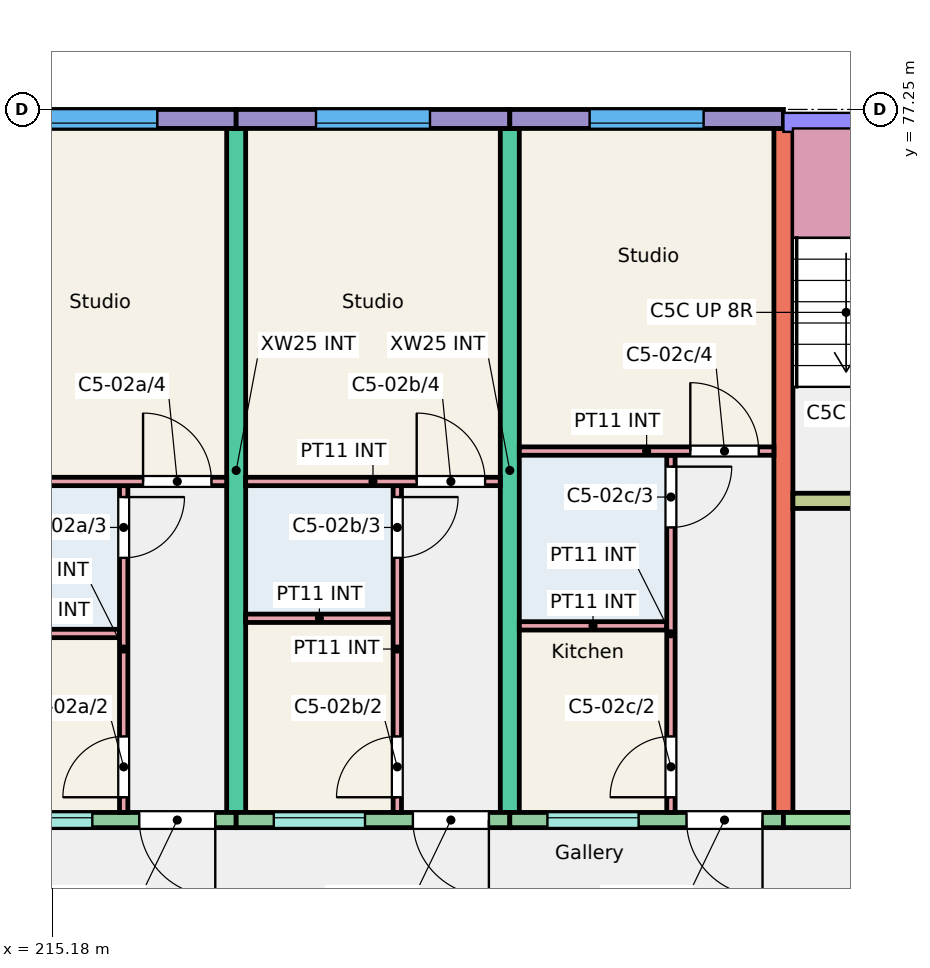
"""IFC4 building model, lengths in metres.
Left out: names, types, materials, properties, quantities, classifications, styles, units other than length and angle.
Written with IfcOpenShell. Run it as: python <this file> out.ifc"""

import sys

from ifc_helpers import new_model, si_unit, direction, frame, frame_2d, origin, place, context, subcontext, project, spatial, rectangle, extrude, element, fill, save


model = new_model("IFC4")
c1 = context("Model", 3, precision=1e-05, world=origin(), true_north=direction((0.0, 1.0)))
c2 = subcontext(c1, "Body", "Model", "MODEL_VIEW")
j1 = project(units=[si_unit("LENGTHUNIT", "METRE"), si_unit("PLANEANGLEUNIT", "RADIAN")], contexts=[c1])
p1 = place(None, origin())
s1 = spatial("IfcSite", under=j1, at=p1, CompositionType="ELEMENT")
p2 = place(p1, origin())
s2 = spatial("IfcBuilding", under=s1, at=p2, CompositionType="ELEMENT")
p3 = place(p2, frame((0.0, 0.0, 6.0)))
s3 = spatial("IfcBuildingStorey", under=s2, at=p3, CompositionType="ELEMENT", Elevation=6.0)
for number, where, z_axis, x_axis in (
    (1, (217.6, 68.0, 0.0), (0.0, 0.0, 1.0), (0.0, 1.0, 0.0)),
    (2, (221.2, 68.0, 0.0), (0.0, 0.0, 1.0), (0.0, 1.0, 0.0)),
    (3, (224.8, 68.0, 0.0), (0.0, 0.0, 1.0), (0.0, 1.0, 0.0)),
):
    element("IfcWall", number, at=place(p3, frame(where, z_axis=z_axis, x_axis=x_axis)), inside=s3, PredefinedType="SHEAR", context=c2, shape_type="SweptSolid", body=[
        extrude(rectangle(XDim=9.0, YDim=0.25, at=frame_2d((4.5, 0.0))), origin(), (0.0, 0.0, 1.0), 3.0),
    ])
p4 = place(p3, frame((214.0, 77.125, 0.0), z_axis=(0.0, 0.0, 1.0), x_axis=(1.0, 0.0, 0.0)))
e4 = element("IfcWall", 4, at=p4, inside=s3, PredefinedType="SOLIDWALL", context=c2, shape_type="SweptSolid", body=[
    extrude(rectangle(XDim=3.6, YDim=0.25, at=frame_2d((1.8, 0.0))), origin(), (0.0, 0.0, 1.0), 3.0),
])
p5 = place(p4, frame((1.062, 0.0, 0.9)))
e5 = element("IfcOpeningElement", 5, at=p5, cuts=e4, PredefinedType="OPENING", context=c2, shape_type="SweptSolid", body=[
    extrude(rectangle(XDim=1.5, YDim=1.5, at=frame_2d((0.75, 0.75))), frame((0.0, 0.135, 0.0), z_axis=(0.0, -1.0, 0.0), x_axis=(1.0, 0.0, 0.0)), (0.0, 0.0, 1.0), 0.27),
])
p6 = place(p3, frame((214.15, 67.9, 0.0), z_axis=(0.0, 0.0, 1.0), x_axis=(1.0, 0.0, 0.0)))
e6 = element("IfcWall", 6, at=p6, inside=s3, PredefinedType="SOLIDWALL", context=c2, shape_type="SweptSolid", body=[
    extrude(rectangle(XDim=3.45, YDim=0.2, at=frame_2d((1.725, 0.0))), origin(), (0.0, 0.0, 1.0), 3.0),
])
p7 = place(p6, frame((0.357, 0.0, 1.1)))
e7 = element("IfcOpeningElement", 7, at=p7, cuts=e6, PredefinedType="OPENING", context=c2, shape_type="SweptSolid", body=[
    extrude(rectangle(XDim=1.2, YDim=1.3, at=frame_2d((0.6, 0.65))), frame((0.0, 0.11, 0.0), z_axis=(0.0, -1.0, 0.0), x_axis=(1.0, 0.0, 0.0)), (0.0, 0.0, 1.0), 0.22),
])
p8 = place(p6, frame((2.175, 0.0, 0.0)))
e8 = element("IfcOpeningElement", 8, at=p8, cuts=e6, PredefinedType="OPENING", context=c2, shape_type="SweptSolid", body=[
    extrude(rectangle(XDim=1.0, YDim=2.1, at=frame_2d((0.5, 1.05))), frame((0.0, 0.11, 0.0), z_axis=(0.0, -1.0, 0.0), x_axis=(1.0, 0.0, 0.0)), (0.0, 0.0, 1.0), 0.22),
])
p9 = place(p3, frame((217.6, 77.125, 0.0), z_axis=(0.0, 0.0, 1.0), x_axis=(1.0, 0.0, 0.0)))
e9 = element("IfcWall", 9, at=p9, inside=s3, PredefinedType="SOLIDWALL", context=c2, shape_type="SweptSolid", body=[
    extrude(rectangle(XDim=3.6, YDim=0.25, at=frame_2d((1.8, 0.0))), origin(), (0.0, 0.0, 1.0), 3.0),
])
p10 = place(p9, frame((1.05, 0.0, 0.9)))
e10 = element("IfcOpeningElement", 10, at=p10, cuts=e9, PredefinedType="OPENING", context=c2, shape_type="SweptSolid", body=[
    extrude(rectangle(XDim=1.5, YDim=1.5, at=frame_2d((0.75, 0.75))), frame((0.0, 0.135, 0.0), z_axis=(0.0, -1.0, 0.0), x_axis=(1.0, 0.0, 0.0)), (0.0, 0.0, 1.0), 0.27),
])
p11 = place(p3, frame((217.6, 67.9, 0.0), z_axis=(0.0, 0.0, 1.0), x_axis=(1.0, 0.0, 0.0)))
e11 = element("IfcWall", 11, at=p11, inside=s3, PredefinedType="SOLIDWALL", context=c2, shape_type="SweptSolid", body=[
    extrude(rectangle(XDim=3.6, YDim=0.2, at=frame_2d((1.8, 0.0))), origin(), (0.0, 0.0, 1.0), 3.0),
])
p12 = place(p11, frame((0.495, 0.0, 1.1)))
e12 = element("IfcOpeningElement", 12, at=p12, cuts=e11, PredefinedType="OPENING", context=c2, shape_type="SweptSolid", body=[
    extrude(rectangle(XDim=1.2, YDim=1.3, at=frame_2d((0.6, 0.65))), frame((0.0, 0.11, 0.0), z_axis=(0.0, -1.0, 0.0), x_axis=(1.0, 0.0, 0.0)), (0.0, 0.0, 1.0), 0.22),
])
p13 = place(p11, frame((2.325, 0.0, 0.0)))
e13 = element("IfcOpeningElement", 13, at=p13, cuts=e11, PredefinedType="OPENING", context=c2, shape_type="SweptSolid", body=[
    extrude(rectangle(XDim=1.0, YDim=2.1, at=frame_2d((0.5, 1.05))), frame((0.0, 0.11, 0.0), z_axis=(0.0, -1.0, 0.0), x_axis=(1.0, 0.0, 0.0)), (0.0, 0.0, 1.0), 0.22),
])
p14 = place(p3, frame((221.2, 77.125, 0.0), z_axis=(0.0, 0.0, 1.0), x_axis=(1.0, 0.0, 0.0)))
e14 = element("IfcWall", 14, at=p14, inside=s3, PredefinedType="SOLIDWALL", context=c2, shape_type="SweptSolid", body=[
    extrude(rectangle(XDim=3.6, YDim=0.25, at=frame_2d((1.8, 0.0))), origin(), (0.0, 0.0, 1.0), 3.0),
])
p15 = place(p14, frame((1.05, 0.0, 0.9)))
e15 = element("IfcOpeningElement", 15, at=p15, cuts=e14, PredefinedType="OPENING", context=c2, shape_type="SweptSolid", body=[
    extrude(rectangle(XDim=1.5, YDim=1.5, at=frame_2d((0.75, 0.75))), frame((0.0, 0.135, 0.0), z_axis=(0.0, -1.0, 0.0), x_axis=(1.0, 0.0, 0.0)), (0.0, 0.0, 1.0), 0.27),
])
p16 = place(p3, frame((221.2, 67.9, 0.0), z_axis=(0.0, 0.0, 1.0), x_axis=(1.0, 0.0, 0.0)))
e16 = element("IfcWall", 16, at=p16, inside=s3, PredefinedType="SOLIDWALL", context=c2, shape_type="SweptSolid", body=[
    extrude(rectangle(XDim=3.6, YDim=0.2, at=frame_2d((1.8, 0.0))), origin(), (0.0, 0.0, 1.0), 3.0),
])
p17 = place(p16, frame((0.495, 0.0, 1.1)))
e17 = element("IfcOpeningElement", 17, at=p17, cuts=e16, PredefinedType="OPENING", context=c2, shape_type="SweptSolid", body=[
    extrude(rectangle(XDim=1.2, YDim=1.3, at=frame_2d((0.6, 0.65))), frame((0.0, 0.11, 0.0), z_axis=(0.0, -1.0, 0.0), x_axis=(1.0, 0.0, 0.0)), (0.0, 0.0, 1.0), 0.22),
])
p18 = place(p16, frame((2.325, 0.0, 0.0)))
e18 = element("IfcOpeningElement", 18, at=p18, cuts=e16, PredefinedType="OPENING", context=c2, shape_type="SweptSolid", body=[
    extrude(rectangle(XDim=1.0, YDim=2.1, at=frame_2d((0.5, 1.05))), frame((0.0, 0.11, 0.0), z_axis=(0.0, -1.0, 0.0), x_axis=(1.0, 0.0, 0.0)), (0.0, 0.0, 1.0), 0.22),
])
p19 = place(p3, frame((224.8, 67.9, 0.0), z_axis=(0.0, 0.0, 1.0), x_axis=(1.0, 0.0, 0.0)))
e19 = element("IfcWall", 19, at=p19, inside=s3, PredefinedType="SHEAR", context=c2, shape_type="SweptSolid", body=[
    extrude(rectangle(XDim=5.85, YDim=0.2, at=frame_2d((2.925, 0.0))), origin(), (0.0, 0.0, 1.0), 3.0),
])
p20 = place(p19, frame((2.438, 0.0, 0.0)))
e20 = element("IfcOpeningElement", 20, at=p20, cuts=e19, PredefinedType="OPENING", context=c2, shape_type="SweptSolid", body=[
    extrude(rectangle(XDim=1.1, YDim=2.1, at=frame_2d((0.55, 1.05))), frame((0.0, 0.11, 0.0), z_axis=(0.0, -1.0, 0.0), x_axis=(1.0, 0.0, 0.0)), (0.0, 0.0, 1.0), 0.22),
])
p21 = place(p3, frame((224.925, 72.1, 0.0), z_axis=(0.0, 0.0, 1.0), x_axis=(1.0, 0.0, 0.0)))
e21 = element("IfcWall", 21, at=p21, inside=s3, PredefinedType="SHEAR", context=c2, shape_type="SweptSolid", body=[
    extrude(rectangle(XDim=5.725, YDim=0.2, at=frame_2d((2.862, 0.0))), origin(), (0.0, 0.0, 1.0), 3.0),
])
p22 = place(p21, frame((0.95, 0.0, 0.0)))
e22 = element("IfcOpeningElement", 22, at=p22, cuts=e21, PredefinedType="OPENING", context=c2, shape_type="SweptSolid", body=[
    extrude(rectangle(XDim=1.0, YDim=2.1, at=frame_2d((0.5, 1.05))), frame((0.0, 0.11, 0.0), z_axis=(0.0, -1.0, 0.0), x_axis=(1.0, 0.0, 0.0)), (0.0, 0.0, 1.0), 0.22),
])
p23 = place(p21, frame((3.863, 0.0, 0.0)))
e23 = element("IfcOpeningElement", 23, at=p23, cuts=e21, PredefinedType="OPENING", context=c2, shape_type="SweptSolid", body=[
    extrude(rectangle(XDim=1.1, YDim=2.1, at=frame_2d((0.55, 1.05))), frame((0.0, 0.11, 0.0), z_axis=(0.0, -1.0, 0.0), x_axis=(1.0, 0.0, 0.0)), (0.0, 0.0, 1.0), 0.22),
])
p24 = place(p3, frame((214.15, 70.355, 0.0), z_axis=(0.0, 0.0, 1.0), x_axis=(1.0, 0.0, 0.0)))
e24 = element("IfcWall", 24, at=p24, inside=s3, PredefinedType="PARTITIONING", context=c2, shape_type="SweptSolid", body=[
    extrude(rectangle(XDim=1.915, YDim=0.11, at=frame_2d((0.958, 0.0))), origin(), (0.0, 0.0, 1.0), 2.8),
])
p25 = place(p3, frame((216.12, 68.0, 0.0), z_axis=(0.0, 0.0, 1.0), x_axis=(0.0, 1.0, 0.0)))
e25 = element("IfcWall", 25, at=p25, inside=s3, PredefinedType="PARTITIONING", context=c2, shape_type="SweptSolid", body=[
    extrude(rectangle(XDim=4.3, YDim=0.11, at=frame_2d((2.15, 0.0))), origin(), (0.0, 0.0, 1.0), 2.8),
])
p26 = place(p25, frame((0.2, 0.0, 0.0)))
e26 = element("IfcOpeningElement", 26, at=p26, cuts=e25, PredefinedType="OPENING", context=c2, shape_type="SweptSolid", body=[
    extrude(rectangle(XDim=0.8, YDim=2.1, at=frame_2d((0.4, 1.05))), frame((0.0, 0.065, 0.0), z_axis=(0.0, -1.0, 0.0), x_axis=(1.0, 0.0, 0.0)), (0.0, 0.0, 1.0), 0.13),
])
p27 = place(p25, frame((3.35, 0.0, 0.0)))
e27 = element("IfcOpeningElement", 27, at=p27, cuts=e25, PredefinedType="OPENING", context=c2, shape_type="SweptSolid", body=[
    extrude(rectangle(XDim=0.8, YDim=2.1, at=frame_2d((0.4, 1.05))), frame((0.0, 0.065, 0.0), z_axis=(0.0, -1.0, 0.0), x_axis=(1.0, 0.0, 0.0)), (0.0, 0.0, 1.0), 0.13),
])
p28 = place(p3, frame((214.15, 72.355, 0.0), z_axis=(0.0, 0.0, 1.0), x_axis=(1.0, 0.0, 0.0)))
e28 = element("IfcWall", 28, at=p28, inside=s3, PredefinedType="PARTITIONING", context=c2, shape_type="SweptSolid", body=[
    extrude(rectangle(XDim=3.325, YDim=0.11, at=frame_2d((1.663, 0.0))), origin(), (0.0, 0.0, 1.0), 2.8),
])
p29 = place(p28, frame((2.225, 0.0, 0.0)))
e29 = element("IfcOpeningElement", 29, at=p29, cuts=e28, PredefinedType="OPENING", context=c2, shape_type="SweptSolid", body=[
    extrude(rectangle(XDim=0.9, YDim=2.1, at=frame_2d((0.45, 1.05))), frame((0.0, 0.065, 0.0), z_axis=(0.0, -1.0, 0.0), x_axis=(1.0, 0.0, 0.0)), (0.0, 0.0, 1.0), 0.13),
])
p30 = place(p3, frame((217.725, 70.555, 0.0), z_axis=(0.0, 0.0, 1.0), x_axis=(1.0, 0.0, 0.0)))
e30 = element("IfcWall", 30, at=p30, inside=s3, PredefinedType="PARTITIONING", context=c2, shape_type="SweptSolid", body=[
    extrude(rectangle(XDim=1.94, YDim=0.11, at=frame_2d((0.97, 0.0))), origin(), (0.0, 0.0, 1.0), 2.8),
])
p31 = place(p3, frame((219.72, 68.0, 0.0), z_axis=(0.0, 0.0, 1.0), x_axis=(0.0, 1.0, 0.0)))
e31 = element("IfcWall", 31, at=p31, inside=s3, PredefinedType="PARTITIONING", context=c2, shape_type="SweptSolid", body=[
    extrude(rectangle(XDim=4.3, YDim=0.11, at=frame_2d((2.15, 0.0))), origin(), (0.0, 0.0, 1.0), 2.8),
])
p32 = place(p31, frame((0.2, 0.0, 0.0)))
e32 = element("IfcOpeningElement", 32, at=p32, cuts=e31, PredefinedType="OPENING", context=c2, shape_type="SweptSolid", body=[
    extrude(rectangle(XDim=0.8, YDim=2.1, at=frame_2d((0.4, 1.05))), frame((0.0, 0.065, 0.0), z_axis=(0.0, -1.0, 0.0), x_axis=(1.0, 0.0, 0.0)), (0.0, 0.0, 1.0), 0.13),
])
p33 = place(p31, frame((3.35, 0.0, 0.0)))
e33 = element("IfcOpeningElement", 33, at=p33, cuts=e31, PredefinedType="OPENING", context=c2, shape_type="SweptSolid", body=[
    extrude(rectangle(XDim=0.8, YDim=2.1, at=frame_2d((0.4, 1.05))), frame((0.0, 0.065, 0.0), z_axis=(0.0, -1.0, 0.0), x_axis=(1.0, 0.0, 0.0)), (0.0, 0.0, 1.0), 0.13),
])
p34 = place(p3, frame((217.725, 72.355, 0.0), z_axis=(0.0, 0.0, 1.0), x_axis=(1.0, 0.0, 0.0)))
e34 = element("IfcWall", 34, at=p34, inside=s3, PredefinedType="PARTITIONING", context=c2, shape_type="SweptSolid", body=[
    extrude(rectangle(XDim=3.35, YDim=0.11, at=frame_2d((1.675, 0.0))), origin(), (0.0, 0.0, 1.0), 2.8),
])
p35 = place(p34, frame((2.25, 0.0, 0.0)))
e35 = element("IfcOpeningElement", 35, at=p35, cuts=e34, PredefinedType="OPENING", context=c2, shape_type="SweptSolid", body=[
    extrude(rectangle(XDim=0.9, YDim=2.1, at=frame_2d((0.45, 1.05))), frame((0.0, 0.065, 0.0), z_axis=(0.0, -1.0, 0.0), x_axis=(1.0, 0.0, 0.0)), (0.0, 0.0, 1.0), 0.13),
])
p36 = place(p3, frame((221.325, 70.455, 0.0), z_axis=(0.0, 0.0, 1.0), x_axis=(1.0, 0.0, 0.0)))
e36 = element("IfcWall", 36, at=p36, inside=s3, PredefinedType="PARTITIONING", context=c2, shape_type="SweptSolid", body=[
    extrude(rectangle(XDim=1.94, YDim=0.11, at=frame_2d((0.97, 0.0))), origin(), (0.0, 0.0, 1.0), 2.8),
])
p37 = place(p3, frame((223.32, 68.0, 0.0), z_axis=(0.0, 0.0, 1.0), x_axis=(0.0, 1.0, 0.0)))
e37 = element("IfcWall", 37, at=p37, inside=s3, PredefinedType="PARTITIONING", context=c2, shape_type="SweptSolid", body=[
    extrude(rectangle(XDim=4.7, YDim=0.11, at=frame_2d((2.35, 0.0))), origin(), (0.0, 0.0, 1.0), 2.8),
])
p38 = place(p37, frame((0.2, 0.0, 0.0)))
e38 = element("IfcOpeningElement", 38, at=p38, cuts=e37, PredefinedType="OPENING", context=c2, shape_type="SweptSolid", body=[
    extrude(rectangle(XDim=0.8, YDim=2.1, at=frame_2d((0.4, 1.05))), frame((0.0, 0.065, 0.0), z_axis=(0.0, -1.0, 0.0), x_axis=(1.0, 0.0, 0.0)), (0.0, 0.0, 1.0), 0.13),
])
p39 = place(p37, frame((3.75, 0.0, 0.0)))
e39 = element("IfcOpeningElement", 39, at=p39, cuts=e37, PredefinedType="OPENING", context=c2, shape_type="SweptSolid", body=[
    extrude(rectangle(XDim=0.8, YDim=2.1, at=frame_2d((0.4, 1.05))), frame((0.0, 0.065, 0.0), z_axis=(0.0, -1.0, 0.0), x_axis=(1.0, 0.0, 0.0)), (0.0, 0.0, 1.0), 0.13),
])
p40 = place(p3, frame((221.325, 72.755, 0.0), z_axis=(0.0, 0.0, 1.0), x_axis=(1.0, 0.0, 0.0)))
e40 = element("IfcWall", 40, at=p40, inside=s3, PredefinedType="PARTITIONING", context=c2, shape_type="SweptSolid", body=[
    extrude(rectangle(XDim=3.35, YDim=0.11, at=frame_2d((1.675, 0.0))), origin(), (0.0, 0.0, 1.0), 2.8),
])
p41 = place(p40, frame((2.25, 0.0, 0.0)))
e41 = element("IfcOpeningElement", 41, at=p41, cuts=e40, PredefinedType="OPENING", context=c2, shape_type="SweptSolid", body=[
    extrude(rectangle(XDim=0.9, YDim=2.1, at=frame_2d((0.45, 1.05))), frame((0.0, 0.065, 0.0), z_axis=(0.0, -1.0, 0.0), x_axis=(1.0, 0.0, 0.0)), (0.0, 0.0, 1.0), 0.13),
])
p42 = place(p7, origin())
e42 = element("IfcWindow", 42, at=p42, inside=s3, PartitioningType="SINGLE_PANEL", PredefinedType="WINDOW", context=c2, shape_type="SweptSolid", body=[
    extrude(rectangle(XDim=1.2, YDim=1.3, at=frame_2d((0.6, 0.65))), frame((0.0, 0.06, 0.0), z_axis=(0.0, -1.0, 0.0), x_axis=(1.0, 0.0, 0.0)), (0.0, 0.0, 1.0), 0.06),
])
fill(e7, e42)
p43 = place(p5, origin())
e43 = element("IfcWindow", 43, at=p43, inside=s3, PartitioningType="SINGLE_PANEL", PredefinedType="WINDOW", context=c2, shape_type="SweptSolid", body=[
    extrude(rectangle(XDim=1.5, YDim=1.5, at=frame_2d((0.75, 0.75))), frame((0.0, -0.025, 0.0), z_axis=(0.0, -1.0, 0.0), x_axis=(1.0, 0.0, 0.0)), (0.0, 0.0, 1.0), 0.06),
])
fill(e5, e43)
p44 = place(p12, origin())
e44 = element("IfcWindow", 44, at=p44, inside=s3, PartitioningType="SINGLE_PANEL", PredefinedType="WINDOW", context=c2, shape_type="SweptSolid", body=[
    extrude(rectangle(XDim=1.2, YDim=1.3, at=frame_2d((0.6, 0.65))), frame((0.0, 0.06, 0.0), z_axis=(0.0, -1.0, 0.0), x_axis=(1.0, 0.0, 0.0)), (0.0, 0.0, 1.0), 0.06),
])
fill(e12, e44)
p45 = place(p10, origin())
e45 = element("IfcWindow", 45, at=p45, inside=s3, PartitioningType="SINGLE_PANEL", PredefinedType="WINDOW", context=c2, shape_type="SweptSolid", body=[
    extrude(rectangle(XDim=1.5, YDim=1.5, at=frame_2d((0.75, 0.75))), frame((0.0, -0.025, 0.0), z_axis=(0.0, -1.0, 0.0), x_axis=(1.0, 0.0, 0.0)), (0.0, 0.0, 1.0), 0.06),
])
fill(e10, e45)
p46 = place(p17, origin())
e46 = element("IfcWindow", 46, at=p46, inside=s3, PartitioningType="SINGLE_PANEL", PredefinedType="WINDOW", context=c2, shape_type="SweptSolid", body=[
    extrude(rectangle(XDim=1.2, YDim=1.3, at=frame_2d((0.6, 0.65))), frame((0.0, 0.06, 0.0), z_axis=(0.0, -1.0, 0.0), x_axis=(1.0, 0.0, 0.0)), (0.0, 0.0, 1.0), 0.06),
])
fill(e17, e46)
p47 = place(p15, origin())
e47 = element("IfcWindow", 47, at=p47, inside=s3, PartitioningType="SINGLE_PANEL", PredefinedType="WINDOW", context=c2, shape_type="SweptSolid", body=[
    extrude(rectangle(XDim=1.5, YDim=1.5, at=frame_2d((0.75, 0.75))), frame((0.0, -0.025, 0.0), z_axis=(0.0, -1.0, 0.0), x_axis=(1.0, 0.0, 0.0)), (0.0, 0.0, 1.0), 0.06),
])
fill(e15, e47)
p48 = place(p8, origin())
e48 = element("IfcDoor", 48, at=p48, inside=s3, OperationType="SINGLE_SWING_RIGHT", PredefinedType="DOOR", context=c2, shape_type="SweptSolid", body=[
    extrude(rectangle(XDim=1.0, YDim=2.1, at=frame_2d((0.5, 1.05))), frame((0.0, 0.025, 0.0), z_axis=(0.0, -1.0, 0.0), x_axis=(1.0, 0.0, 0.0)), (0.0, 0.0, 1.0), 0.05),
])
fill(e8, e48)
p49 = place(p26, origin())
e49 = element("IfcDoor", 49, at=p49, inside=s3, OperationType="SINGLE_SWING_LEFT", PredefinedType="DOOR", context=c2, shape_type="SweptSolid", body=[
    extrude(rectangle(XDim=0.8, YDim=2.1, at=frame_2d((0.4, 1.05))), frame((0.0, 0.025, 0.0), z_axis=(0.0, -1.0, 0.0), x_axis=(1.0, 0.0, 0.0)), (0.0, 0.0, 1.0), 0.05),
])
fill(e26, e49)
p50 = place(p27, origin())
e50 = element("IfcDoor", 50, at=p50, inside=s3, OperationType="SINGLE_SWING_RIGHT", PredefinedType="DOOR", context=c2, shape_type="SweptSolid", body=[
    extrude(rectangle(XDim=0.8, YDim=2.1, at=frame_2d((0.4, 1.05))), frame((0.0, 0.025, 0.0), z_axis=(0.0, -1.0, 0.0), x_axis=(1.0, 0.0, 0.0)), (0.0, 0.0, 1.0), 0.05),
])
fill(e27, e50)
p51 = place(p29, origin())
e51 = element("IfcDoor", 51, at=p51, inside=s3, OperationType="SINGLE_SWING_LEFT", PredefinedType="DOOR", context=c2, shape_type="SweptSolid", body=[
    extrude(rectangle(XDim=0.9, YDim=2.1, at=frame_2d((0.45, 1.05))), frame((0.0, 0.025, 0.0), z_axis=(0.0, -1.0, 0.0), x_axis=(1.0, 0.0, 0.0)), (0.0, 0.0, 1.0), 0.05),
])
fill(e29, e51)
p52 = place(p13, origin())
e52 = element("IfcDoor", 52, at=p52, inside=s3, OperationType="SINGLE_SWING_RIGHT", PredefinedType="DOOR", context=c2, shape_type="SweptSolid", body=[
    extrude(rectangle(XDim=1.0, YDim=2.1, at=frame_2d((0.5, 1.05))), frame((0.0, 0.025, 0.0), z_axis=(0.0, -1.0, 0.0), x_axis=(1.0, 0.0, 0.0)), (0.0, 0.0, 1.0), 0.05),
])
fill(e13, e52)
p53 = place(p32, origin())
e53 = element("IfcDoor", 53, at=p53, inside=s3, OperationType="SINGLE_SWING_LEFT", PredefinedType="DOOR", context=c2, shape_type="SweptSolid", body=[
    extrude(rectangle(XDim=0.8, YDim=2.1, at=frame_2d((0.4, 1.05))), frame((0.0, 0.025, 0.0), z_axis=(0.0, -1.0, 0.0), x_axis=(1.0, 0.0, 0.0)), (0.0, 0.0, 1.0), 0.05),
])
fill(e32, e53)
p54 = place(p33, origin())
e54 = element("IfcDoor", 54, at=p54, inside=s3, OperationType="SINGLE_SWING_RIGHT", PredefinedType="DOOR", context=c2, shape_type="SweptSolid", body=[
    extrude(rectangle(XDim=0.8, YDim=2.1, at=frame_2d((0.4, 1.05))), frame((0.0, 0.025, 0.0), z_axis=(0.0, -1.0, 0.0), x_axis=(1.0, 0.0, 0.0)), (0.0, 0.0, 1.0), 0.05),
])
fill(e33, e54)
p55 = place(p35, origin())
e55 = element("IfcDoor", 55, at=p55, inside=s3, OperationType="SINGLE_SWING_LEFT", PredefinedType="DOOR", context=c2, shape_type="SweptSolid", body=[
    extrude(rectangle(XDim=0.9, YDim=2.1, at=frame_2d((0.45, 1.05))), frame((0.0, 0.025, 0.0), z_axis=(0.0, -1.0, 0.0), x_axis=(1.0, 0.0, 0.0)), (0.0, 0.0, 1.0), 0.05),
])
fill(e35, e55)
p56 = place(p18, origin())
e56 = element("IfcDoor", 56, at=p56, inside=s3, OperationType="SINGLE_SWING_RIGHT", PredefinedType="DOOR", context=c2, shape_type="SweptSolid", body=[
    extrude(rectangle(XDim=1.0, YDim=2.1, at=frame_2d((0.5, 1.05))), frame((0.0, 0.025, 0.0), z_axis=(0.0, -1.0, 0.0), x_axis=(1.0, 0.0, 0.0)), (0.0, 0.0, 1.0), 0.05),
])
fill(e18, e56)
p57 = place(p38, origin())
e57 = element("IfcDoor", 57, at=p57, inside=s3, OperationType="SINGLE_SWING_LEFT", PredefinedType="DOOR", context=c2, shape_type="SweptSolid", body=[
    extrude(rectangle(XDim=0.8, YDim=2.1, at=frame_2d((0.4, 1.05))), frame((0.0, 0.025, 0.0), z_axis=(0.0, -1.0, 0.0), x_axis=(1.0, 0.0, 0.0)), (0.0, 0.0, 1.0), 0.05),
])
fill(e38, e57)
p58 = place(p39, origin())
e58 = element("IfcDoor", 58, at=p58, inside=s3, OperationType="SINGLE_SWING_RIGHT", PredefinedType="DOOR", context=c2, shape_type="SweptSolid", body=[
    extrude(rectangle(XDim=0.8, YDim=2.1, at=frame_2d((0.4, 1.05))), frame((0.0, 0.025, 0.0), z_axis=(0.0, -1.0, 0.0), x_axis=(1.0, 0.0, 0.0)), (0.0, 0.0, 1.0), 0.05),
])
fill(e39, e58)
p59 = place(p41, origin())
e59 = element("IfcDoor", 59, at=p59, inside=s3, OperationType="SINGLE_SWING_LEFT", PredefinedType="DOOR", context=c2, shape_type="SweptSolid", body=[
    extrude(rectangle(XDim=0.9, YDim=2.1, at=frame_2d((0.45, 1.05))), frame((0.0, 0.025, 0.0), z_axis=(0.0, -1.0, 0.0), x_axis=(1.0, 0.0, 0.0)), (0.0, 0.0, 1.0), 0.05),
])
fill(e41, e59)
save(model, sys.argv[1])
